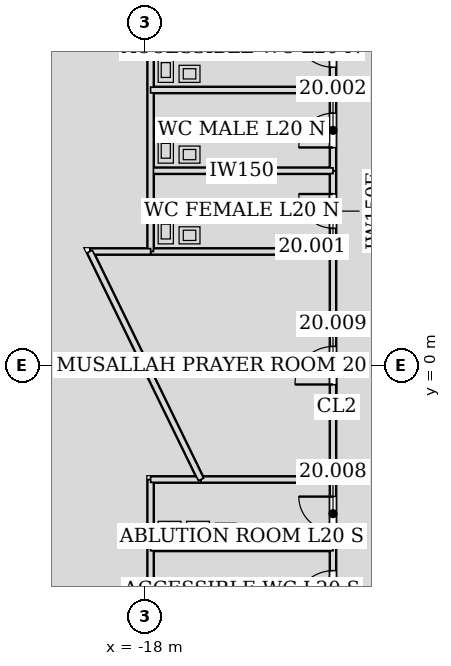
"""IFC4 building model, lengths in metres.
Left out: names, types, materials, properties, quantities, classifications, styles, units other than length and angle.
Written with IfcOpenShell. Run it as: python <this file> out.ifc"""

import sys

from ifc_helpers import new_model, si_unit, direction, frame, frame_2d, origin, place, context, subcontext, project, spatial, rectangle, extrude, element, fill, save


model = new_model("IFC4")
c1 = context("Model", 3, precision=1e-05, world=origin(), true_north=direction((0.0, 1.0)))
c2 = subcontext(c1, "Body", "Model", "MODEL_VIEW")
j1 = project(units=[si_unit("LENGTHUNIT", "METRE"), si_unit("PLANEANGLEUNIT", "RADIAN")], contexts=[c1])
p1 = place(None, origin())
s1 = spatial("IfcSite", under=j1, at=p1, CompositionType="ELEMENT")
p2 = place(p1, origin())
s2 = spatial("IfcBuilding", under=s1, at=p2, CompositionType="ELEMENT")
p3 = place(p2, frame((0.0, 0.0, 91.8)))
s3 = spatial("IfcBuildingStorey", under=s2, at=p3, CompositionType="ELEMENT", Elevation=91.8)
p4 = place(p3, frame((-13.05, 5.126, 0.0), z_axis=(0.0, 0.0, 1.0), x_axis=(0.0, -1.0, 0.0)))
e1 = element("IfcWall", 1, at=p4, inside=s3, PredefinedType="PARTITIONING", context=c2, shape_type="SweptSolid", body=[
    extrude(rectangle(XDim=2.127, YDim=0.15, at=frame_2d((1.063, 0.0))), origin(), (0.0, 0.0, 1.0), 4.035),
])
p5 = place(p4, frame((0.614, 0.0, 0.0)))
e2 = element("IfcOpeningElement", 2, at=p5, cuts=e1, PredefinedType="OPENING", context=c2, shape_type="SweptSolid", body=[
    extrude(rectangle(XDim=0.9, YDim=2.1, at=frame_2d((0.45, 1.05))), frame((0.0, 0.085, 0.0), z_axis=(0.0, -1.0, 0.0), x_axis=(1.0, 0.0, 0.0)), (0.0, 0.0, 1.0), 0.17),
])
p6 = place(p3, frame((-13.05, 7.251, 0.0), z_axis=(0.0, 0.0, 1.0), x_axis=(0.0, -1.0, 0.0)))
e3 = element("IfcWall", 3, at=p6, inside=s3, PredefinedType="PARTITIONING", context=c2, shape_type="SweptSolid", body=[
    extrude(rectangle(XDim=2.127, YDim=0.15, at=frame_2d((1.063, 0.0))), origin(), (0.0, 0.0, 1.0), 4.035),
])
p7 = place(p6, frame((0.614, 0.0, 0.0)))
e4 = element("IfcOpeningElement", 4, at=p7, cuts=e3, PredefinedType="OPENING", context=c2, shape_type="SweptSolid", body=[
    extrude(rectangle(XDim=0.9, YDim=2.1, at=frame_2d((0.45, 1.05))), frame((0.0, 0.085, 0.0), z_axis=(0.0, -1.0, 0.0), x_axis=(1.0, 0.0, 0.0)), (0.0, 0.0, 1.0), 0.17),
])
p8 = place(p3, frame((-13.05, 9.451, 0.0), z_axis=(0.0, 0.0, 1.0), x_axis=(0.0, -1.0, 0.0)))
e5 = element("IfcWall", 5, at=p8, inside=s3, PredefinedType="PARTITIONING", context=c2, shape_type="SweptSolid", body=[
    extrude(rectangle(XDim=2.202, YDim=0.15, at=frame_2d((1.101, 0.0))), origin(), (0.0, 0.0, 1.0), 4.035),
])
p9 = place(p8, frame((0.601, 0.0, 0.0)))
e6 = element("IfcOpeningElement", 6, at=p9, cuts=e5, PredefinedType="OPENING", context=c2, shape_type="SweptSolid", body=[
    extrude(rectangle(XDim=1.0, YDim=2.1, at=frame_2d((0.5, 1.05))), frame((0.0, 0.085, 0.0), z_axis=(0.0, -1.0, 0.0), x_axis=(1.0, 0.0, 0.0)), (0.0, 0.0, 1.0), 0.17),
])
p10 = place(p3, frame((-13.05, -4.799, 0.0), z_axis=(0.0, 0.0, 1.0), x_axis=(0.0, -1.0, 0.0)))
e7 = element("IfcWall", 7, at=p10, inside=s3, PredefinedType="PARTITIONING", context=c2, shape_type="SweptSolid", body=[
    extrude(rectangle(XDim=2.202, YDim=0.15, at=frame_2d((1.101, 0.0))), origin(), (0.0, 0.0, 1.0), 4.035),
])
p11 = place(p10, frame((0.601, 0.0, 0.0)))
e8 = element("IfcOpeningElement", 8, at=p11, cuts=e7, PredefinedType="OPENING", context=c2, shape_type="SweptSolid", body=[
    extrude(rectangle(XDim=1.0, YDim=2.1, at=frame_2d((0.5, 1.05))), frame((0.0, 0.085, 0.0), z_axis=(0.0, -1.0, 0.0), x_axis=(1.0, 0.0, 0.0)), (0.0, 0.0, 1.0), 0.17),
])
p12 = place(p3, frame((-13.05, -2.999, 0.0), z_axis=(0.0, 0.0, 1.0), x_axis=(0.0, -1.0, 0.0)))
e9 = element("IfcWall", 9, at=p12, inside=s3, PredefinedType="PARTITIONING", context=c2, shape_type="SweptSolid", body=[
    extrude(rectangle(XDim=1.802, YDim=0.15, at=frame_2d((0.901, 0.0))), origin(), (0.0, 0.0, 1.0), 4.035),
])
p13 = place(p12, frame((0.451, 0.0, 0.0)))
e10 = element("IfcOpeningElement", 10, at=p13, cuts=e9, PredefinedType="OPENING", context=c2, shape_type="SweptSolid", body=[
    extrude(rectangle(XDim=0.9, YDim=2.1, at=frame_2d((0.45, 1.05))), frame((0.0, 0.085, 0.0), z_axis=(0.0, -1.0, 0.0), x_axis=(1.0, 0.0, 0.0)), (0.0, 0.0, 1.0), 0.17),
])
p14 = place(p3, frame((-13.05, 3.001, 0.0), z_axis=(0.0, 0.0, 1.0), x_axis=(0.0, -1.0, 0.0)))
e11 = element("IfcWall", 11, at=p14, inside=s3, PredefinedType="PARTITIONING", context=c2, shape_type="SweptSolid", body=[
    extrude(rectangle(XDim=6.002, YDim=0.15, at=frame_2d((3.001, 0.0))), origin(), (0.0, 0.0, 1.0), 3.065),
])
p15 = place(p14, frame((2.501, 0.0, 0.0)))
e12 = element("IfcOpeningElement", 12, at=p15, cuts=e11, PredefinedType="OPENING", context=c2, shape_type="SweptSolid", body=[
    extrude(rectangle(XDim=1.0, YDim=2.1, at=frame_2d((0.5, 1.05))), frame((0.0, 0.085, 0.0), z_axis=(0.0, -1.0, 0.0), x_axis=(1.0, 0.0, 0.0)), (0.0, 0.0, 1.0), 0.17),
])
for number, where, z_axis, x_axis in (
    (13, (-13.05, 5.125, 0.0), (0.0, 0.0, 1.0), (-1.0, 0.0, 0.0)),
    (14, (-17.85, 3.0, 0.0), (0.0, 0.0, 1.0), (1.0, 0.0, 0.0)),
):
    element("IfcWall", number, at=place(p3, frame(where, z_axis=z_axis, x_axis=x_axis)), inside=s3, PredefinedType="PARTITIONING", context=c2, shape_type="SweptSolid", body=[
        extrude(rectangle(XDim=4.8, YDim=0.15, at=frame_2d((2.4, 0.0))), origin(), (0.0, 0.0, 1.0), 3.491),
    ])
p16 = place(p3, frame((-17.85, 3.0, 0.0), z_axis=(0.0, 0.0, 1.0), x_axis=(0.0, 1.0, 0.0)))
e15 = element("IfcWall", 15, at=p16, inside=s3, PredefinedType="PARTITIONING", context=c2, shape_type="SweptSolid", body=[
    extrude(rectangle(XDim=6.45, YDim=0.15, at=frame_2d((3.225, 0.0))), origin(), (0.0, 0.0, 1.0), 4.035),
])
p17 = place(p3, frame((-13.05, 7.25, 0.0), z_axis=(0.0, 0.0, 1.0), x_axis=(-1.0, 0.0, 0.0)))
e16 = element("IfcWall", 16, at=p17, inside=s3, PredefinedType="PARTITIONING", context=c2, shape_type="SweptSolid", body=[
    extrude(rectangle(XDim=4.8, YDim=0.15, at=frame_2d((2.4, 0.0))), origin(), (0.0, 0.0, 1.0), 3.491),
])
p18 = place(p3, frame((-17.85, -9.125, 0.0), z_axis=(0.0, 0.0, 1.0), x_axis=(0.0, 1.0, 0.0)))
e17 = element("IfcWall", 17, at=p18, inside=s3, PredefinedType="PARTITIONING", context=c2, shape_type="SweptSolid", body=[
    extrude(rectangle(XDim=6.125, YDim=0.15, at=frame_2d((3.062, 0.0))), origin(), (0.0, 0.0, 1.0), 4.035),
])
p19 = place(p3, frame((-13.05, -4.8, 0.0), z_axis=(0.0, 0.0, 1.0), x_axis=(-1.0, 0.0, 0.0)))
e18 = element("IfcWall", 18, at=p19, inside=s3, PredefinedType="PARTITIONING", context=c2, shape_type="SweptSolid", body=[
    extrude(rectangle(XDim=4.8, YDim=0.15, at=frame_2d((2.4, 0.0))), origin(), (0.0, 0.0, 1.0), 3.491),
])
p20 = place(p3, frame((-13.05, -3.0, 0.0), z_axis=(0.0, 0.0, 1.0), x_axis=(-1.0, 0.0, 0.0)))
e19 = element("IfcWall", 19, at=p20, inside=s3, PredefinedType="PARTITIONING", context=c2, shape_type="SweptSolid", body=[
    extrude(rectangle(XDim=3.475, YDim=0.15, at=frame_2d((1.737, 0.0))), origin(), (0.0, 0.0, 1.0), 3.491),
])
p21 = place(p3, frame((-16.522, -3.0, 0.0), z_axis=(0.0, 0.0, 1.0), x_axis=(-1.0, 0.0, 0.0)))
e20 = element("IfcWall", 20, at=p21, inside=s3, PredefinedType="PARTITIONING", context=c2, shape_type="SweptSolid", body=[
    extrude(rectangle(XDim=1.328, YDim=0.15, at=frame_2d((0.664, 0.0))), origin(), (0.0, 0.0, 1.0), 4.035),
])
p22 = place(p3, frame((-17.849, 3.0, 0.0), z_axis=(0.0, 0.0, 1.0), x_axis=(-1.0, 0.0, 0.0)))
e21 = element("IfcWall", 21, at=p22, inside=s3, PredefinedType="PARTITIONING", context=c2, shape_type="SweptSolid", body=[
    extrude(rectangle(XDim=1.601, YDim=0.15, at=frame_2d((0.8, 0.0))), origin(), (0.0, 0.0, 1.0), 3.499),
])
p23 = place(p3, frame((-19.45, 3.0, 0.0), z_axis=(0.0, 0.0, 1.0), x_axis=(0.43835589904, -0.898801482963, 0.0)))
e22 = element("IfcWall", 22, at=p23, inside=s3, PredefinedType="PARTITIONING", context=c2, shape_type="SweptSolid", body=[
    extrude(rectangle(XDim=6.676, YDim=0.15, at=frame_2d((3.338, 0.0))), origin(), (0.0, 0.0, 1.0), 3.065),
])
p24 = place(p5, frame((0.9, 0.0, 0.0), z_axis=(0.0, 0.0, 1.0), x_axis=(-1.0, 0.0, 0.0)))
e23 = element("IfcDoor", 23, at=p24, inside=s3, OperationType="SINGLE_SWING_RIGHT", PredefinedType="DOOR", context=c2, shape_type="SweptSolid", body=[
    extrude(rectangle(XDim=0.9, YDim=2.1, at=frame_2d((0.45, 1.05))), frame((0.0, 0.025, 0.0), z_axis=(0.0, -1.0, 0.0), x_axis=(1.0, 0.0, 0.0)), (0.0, 0.0, 1.0), 0.05),
])
fill(e2, e23)
p25 = place(p7, frame((0.9, 0.0, 0.0), z_axis=(0.0, 0.0, 1.0), x_axis=(-1.0, 0.0, 0.0)))
e24 = element("IfcDoor", 24, at=p25, inside=s3, OperationType="SINGLE_SWING_LEFT", PredefinedType="DOOR", context=c2, shape_type="SweptSolid", body=[
    extrude(rectangle(XDim=0.9, YDim=2.1, at=frame_2d((0.45, 1.05))), frame((0.0, 0.025, 0.0), z_axis=(0.0, -1.0, 0.0), x_axis=(1.0, 0.0, 0.0)), (0.0, 0.0, 1.0), 0.05),
])
fill(e4, e24)
p26 = place(p9, frame((1.0, 0.0, 0.0), z_axis=(0.0, 0.0, 1.0), x_axis=(-1.0, 0.0, 0.0)))
e25 = element("IfcDoor", 25, at=p26, inside=s3, OperationType="SINGLE_SWING_RIGHT", PredefinedType="DOOR", context=c2, shape_type="SweptSolid", body=[
    extrude(rectangle(XDim=1.0, YDim=2.1, at=frame_2d((0.5, 1.05))), frame((0.0, 0.025, 0.0), z_axis=(0.0, -1.0, 0.0), x_axis=(1.0, 0.0, 0.0)), (0.0, 0.0, 1.0), 0.05),
])
fill(e6, e25)
p27 = place(p11, frame((1.0, 0.0, 0.0), z_axis=(0.0, 0.0, 1.0), x_axis=(-1.0, 0.0, 0.0)))
e26 = element("IfcDoor", 26, at=p27, inside=s3, OperationType="SINGLE_SWING_LEFT", PredefinedType="DOOR", context=c2, shape_type="SweptSolid", body=[
    extrude(rectangle(XDim=1.0, YDim=2.1, at=frame_2d((0.5, 1.05))), frame((0.0, 0.025, 0.0), z_axis=(0.0, -1.0, 0.0), x_axis=(1.0, 0.0, 0.0)), (0.0, 0.0, 1.0), 0.05),
])
fill(e8, e26)
p28 = place(p13, frame((0.9, 0.0, 0.0), z_axis=(0.0, 0.0, 1.0), x_axis=(-1.0, 0.0, 0.0)))
e27 = element("IfcDoor", 27, at=p28, inside=s3, OperationType="SINGLE_SWING_RIGHT", PredefinedType="DOOR", context=c2, shape_type="SweptSolid", body=[
    extrude(rectangle(XDim=0.9, YDim=2.1, at=frame_2d((0.45, 1.05))), frame((0.0, 0.025, 0.0), z_axis=(0.0, -1.0, 0.0), x_axis=(1.0, 0.0, 0.0)), (0.0, 0.0, 1.0), 0.05),
])
fill(e10, e27)
p29 = place(p15, frame((1.0, 0.0, 0.0), z_axis=(0.0, 0.0, 1.0), x_axis=(-1.0, 0.0, 0.0)))
e28 = element("IfcDoor", 28, at=p29, inside=s3, OperationType="SINGLE_SWING_LEFT", PredefinedType="DOOR", context=c2, shape_type="SweptSolid", body=[
    extrude(rectangle(XDim=1.0, YDim=2.1, at=frame_2d((0.5, 1.05))), frame((0.0, 0.025, 0.0), z_axis=(0.0, -1.0, 0.0), x_axis=(1.0, 0.0, 0.0)), (0.0, 0.0, 1.0), 0.05),
])
fill(e12, e28)
save(model, sys.argv[1])
